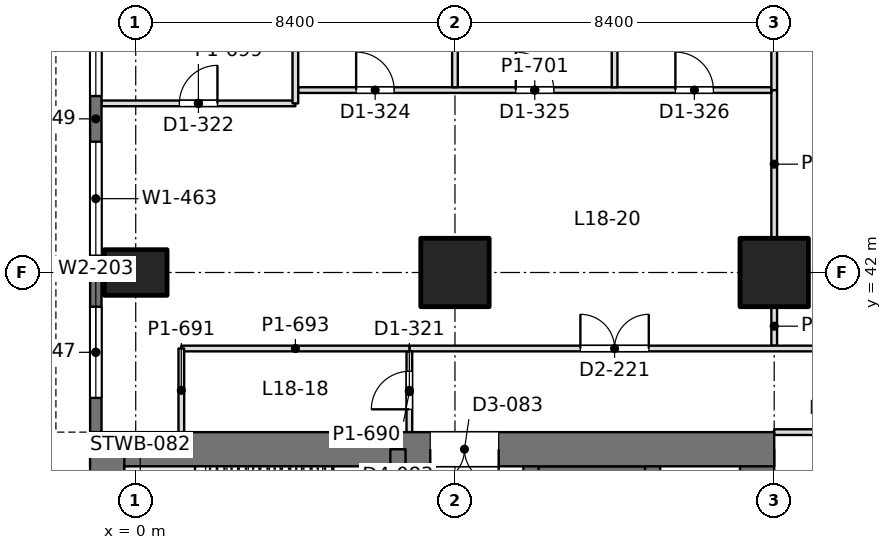
"""IFC4 building model, lengths in metres.
Left out: names, types, materials, properties, quantities, classifications, styles, units other than length and angle.
Written with IfcOpenShell. Run it as: python <this file> out.ifc"""

import sys

from ifc_helpers import new_model, si_unit, direction, frame, frame_2d, origin, origin_2d, place, context, subcontext, project, spatial, rectangle, extrude, element, fill, save


model = new_model("IFC4")
c1 = context("Model", 3, precision=1e-05, world=origin(), true_north=direction((0.0, 1.0)))
c2 = subcontext(c1, "Body", "Model", "MODEL_VIEW")
j1 = project(units=[si_unit("LENGTHUNIT", "METRE"), si_unit("PLANEANGLEUNIT", "RADIAN")], contexts=[c1])
p1 = place(None, origin())
s1 = spatial("IfcSite", under=j1, at=p1, CompositionType="ELEMENT")
p2 = place(p1, origin())
s2 = spatial("IfcBuilding", under=s1, at=p2, CompositionType="ELEMENT")
p3 = place(p2, frame((0.0, 0.0, 81.9)))
s3 = spatial("IfcBuildingStorey", under=s2, at=p3, CompositionType="ELEMENT", Elevation=81.9)
p4 = place(p3, frame((0.0, 42.0, 0.0), z_axis=(0.0, 0.0, 1.0), x_axis=(0.0, 1.0, 0.0)))
e1 = element("IfcColumn", 1, at=p4, inside=s3, PredefinedType="COLUMN", context=c2, shape_type="SweptSolid", body=[
    extrude(rectangle(XDim=1.2, YDim=1.65, at=origin_2d()), origin(), (0.0, 0.0, 1.0), 4.5),
])
for number, where, z_axis, x_axis in (
    (2, (8.4, 42.0, 0.0), (0.0, 0.0, 1.0), (1.0, 0.0, 0.0)),
    (3, (16.8, 42.0, 0.0), (0.0, 0.0, 1.0), (1.0, 0.0, 0.0)),
):
    element("IfcColumn", number, at=place(p3, frame(where, z_axis=z_axis, x_axis=x_axis)), inside=s3, PredefinedType="COLUMN", context=c2, shape_type="SweptSolid", body=[
        extrude(rectangle(XDim=1.8, YDim=1.8, at=origin_2d()), origin(), (0.0, 0.0, 1.0), 4.5),
    ])
p5 = place(p3, frame((-1.2, 37.35, 0.0), z_axis=(0.0, 0.0, 1.0), x_axis=(1.0, 0.0, 0.0)))
e4 = element("IfcWall", 4, at=p5, inside=s3, PredefinedType="SHEAR", context=c2, shape_type="SweptSolid", body=[
    extrude(rectangle(XDim=18.0, YDim=0.9, at=frame_2d((9.0, 0.0))), origin(), (0.0, 0.0, 1.0), 4.5),
])
p6 = place(p5, frame((8.95, 0.0, 0.0)))
e5 = element("IfcOpeningElement", 5, at=p6, cuts=e4, PredefinedType="OPENING", context=c2, shape_type="SweptSolid", body=[
    extrude(rectangle(XDim=1.8, YDim=2.4, at=frame_2d((0.9, 1.2))), frame((0.0, 0.46, 0.0), z_axis=(0.0, -1.0, 0.0), x_axis=(1.0, 0.0, 0.0)), (0.0, 0.0, 1.0), 0.92),
])
for number, where, z_axis, x_axis in (
    (6, (-0.75, 13.05, 0.0), (0.0, 0.0, 1.0), (0.0, 1.0, 0.0)),
    (7, (16.35, 13.05, 0.0), (0.0, 0.0, 1.0), (0.0, 1.0, 0.0)),
):
    element("IfcWall", number, at=place(p3, frame(where, z_axis=z_axis, x_axis=x_axis)), inside=s3, PredefinedType="SHEAR", context=c2, shape_type="SweptSolid", body=[
        extrude(rectangle(XDim=24.3, YDim=0.9, at=frame_2d((12.15, 0.0))), origin(), (0.0, 0.0, 1.0), 4.5),
    ])
p7 = place(p3, frame((6.9, 13.05, 0.0), z_axis=(0.0, 0.0, 1.0), x_axis=(0.0, 1.0, 0.0)))
e8 = element("IfcWall", 8, at=p7, inside=s3, PredefinedType="SHEAR", context=c2, shape_type="SweptSolid", body=[
    extrude(rectangle(XDim=24.3, YDim=0.4, at=frame_2d((12.15, 0.0))), origin(), (0.0, 0.0, 1.0), 4.5),
])
p8 = place(p7, frame((1.3, 0.0, 0.0)))
e9 = element("IfcOpeningElement", 9, at=p8, cuts=e8, PredefinedType="OPENING", context=c2, shape_type="SweptSolid", body=[
    extrude(rectangle(XDim=1.0, YDim=2.2, at=frame_2d((0.5, 1.1))), frame((0.0, 0.21, 0.0), z_axis=(0.0, -1.0, 0.0), x_axis=(1.0, 0.0, 0.0)), (0.0, 0.0, 1.0), 0.42),
])
p9 = place(p7, frame((22.0, 0.0, 0.0)))
e10 = element("IfcOpeningElement", 10, at=p9, cuts=e8, PredefinedType="OPENING", context=c2, shape_type="SweptSolid", body=[
    extrude(rectangle(XDim=1.0, YDim=2.2, at=frame_2d((0.5, 1.1))), frame((0.0, 0.21, 0.0), z_axis=(0.0, -1.0, 0.0), x_axis=(1.0, 0.0, 0.0)), (0.0, 0.0, 1.0), 0.42),
])
p10 = place(p7, frame((5.55, 0.0, 0.0)))
e11 = element("IfcOpeningElement", 11, at=p10, cuts=e8, PredefinedType="OPENING", context=c2, shape_type="SweptSolid", body=[
    extrude(rectangle(XDim=1.0, YDim=2.2, at=frame_2d((0.5, 1.1))), frame((0.0, 0.21, 0.0), z_axis=(0.0, -1.0, 0.0), x_axis=(1.0, 0.0, 0.0)), (0.0, 0.0, 1.0), 0.42),
])
p11 = place(p7, frame((9.55, 0.0, 0.0)))
e12 = element("IfcOpeningElement", 12, at=p11, cuts=e8, PredefinedType="OPENING", context=c2, shape_type="SweptSolid", body=[
    extrude(rectangle(XDim=1.0, YDim=2.2, at=frame_2d((0.5, 1.1))), frame((0.0, 0.21, 0.0), z_axis=(0.0, -1.0, 0.0), x_axis=(1.0, 0.0, 0.0)), (0.0, 0.0, 1.0), 0.42),
])
p12 = place(p7, frame((12.8, 0.0, 0.0)))
e13 = element("IfcOpeningElement", 13, at=p12, cuts=e8, PredefinedType="OPENING", context=c2, shape_type="SweptSolid", body=[
    extrude(rectangle(XDim=1.1, YDim=2.2, at=frame_2d((0.55, 1.1))), frame((0.0, 0.21, 0.0), z_axis=(0.0, -1.0, 0.0), x_axis=(1.0, 0.0, 0.0)), (0.0, 0.0, 1.0), 0.42),
])
p13 = place(p7, frame((15.538, 0.0, 0.0)))
e14 = element("IfcOpeningElement", 14, at=p13, cuts=e8, PredefinedType="OPENING", context=c2, shape_type="SweptSolid", body=[
    extrude(rectangle(XDim=1.1, YDim=2.2, at=frame_2d((0.55, 1.1))), frame((0.0, 0.21, 0.0), z_axis=(0.0, -1.0, 0.0), x_axis=(1.0, 0.0, 0.0)), (0.0, 0.0, 1.0), 0.42),
])
p14 = place(p7, frame((18.262, 0.0, 0.0)))
e15 = element("IfcOpeningElement", 15, at=p14, cuts=e8, PredefinedType="OPENING", context=c2, shape_type="SweptSolid", body=[
    extrude(rectangle(XDim=1.1, YDim=2.2, at=frame_2d((0.55, 1.1))), frame((0.0, 0.21, 0.0), z_axis=(0.0, -1.0, 0.0), x_axis=(1.0, 0.0, 0.0)), (0.0, 0.0, 1.0), 0.42),
])
p15 = place(p3, frame((10.4, 13.05, 0.0), z_axis=(0.0, 0.0, 1.0), x_axis=(0.0, 1.0, 0.0)))
e16 = element("IfcWall", 16, at=p15, inside=s3, PredefinedType="SHEAR", context=c2, shape_type="SweptSolid", body=[
    extrude(rectangle(XDim=24.3, YDim=0.4, at=frame_2d((12.15, 0.0))), origin(), (0.0, 0.0, 1.0), 4.5),
])
p16 = place(p15, frame((1.5, 0.0, 0.0)))
e17 = element("IfcOpeningElement", 17, at=p16, cuts=e16, PredefinedType="OPENING", context=c2, shape_type="SweptSolid", body=[
    extrude(rectangle(XDim=1.1, YDim=2.2, at=frame_2d((0.55, 1.1))), frame((0.0, 0.21, 0.0), z_axis=(0.0, -1.0, 0.0), x_axis=(1.0, 0.0, 0.0)), (0.0, 0.0, 1.0), 0.42),
])
p17 = place(p15, frame((4.35, 0.0, 0.0)))
e18 = element("IfcOpeningElement", 18, at=p17, cuts=e16, PredefinedType="OPENING", context=c2, shape_type="SweptSolid", body=[
    extrude(rectangle(XDim=1.1, YDim=2.2, at=frame_2d((0.55, 1.1))), frame((0.0, 0.21, 0.0), z_axis=(0.0, -1.0, 0.0), x_axis=(1.0, 0.0, 0.0)), (0.0, 0.0, 1.0), 0.42),
])
p18 = place(p15, frame((7.2, 0.0, 0.0)))
e19 = element("IfcOpeningElement", 19, at=p18, cuts=e16, PredefinedType="OPENING", context=c2, shape_type="SweptSolid", body=[
    extrude(rectangle(XDim=1.1, YDim=2.2, at=frame_2d((0.55, 1.1))), frame((0.0, 0.21, 0.0), z_axis=(0.0, -1.0, 0.0), x_axis=(1.0, 0.0, 0.0)), (0.0, 0.0, 1.0), 0.42),
])
p19 = place(p15, frame((21.45, 0.0, 0.0)))
e20 = element("IfcOpeningElement", 20, at=p19, cuts=e16, PredefinedType="OPENING", context=c2, shape_type="SweptSolid", body=[
    extrude(rectangle(XDim=1.1, YDim=2.2, at=frame_2d((0.55, 1.1))), frame((0.0, 0.21, 0.0), z_axis=(0.0, -1.0, 0.0), x_axis=(1.0, 0.0, 0.0)), (0.0, 0.0, 1.0), 0.42),
])
p20 = place(p3, frame((13.6, 13.05, 0.0), z_axis=(0.0, 0.0, 1.0), x_axis=(0.0, 1.0, 0.0)))
e21 = element("IfcWall", 21, at=p20, inside=s3, PredefinedType="SHEAR", context=c2, shape_type="SweptSolid", body=[
    extrude(rectangle(XDim=24.3, YDim=0.4, at=frame_2d((12.15, 0.0))), origin(), (0.0, 0.0, 1.0), 4.5),
])
p21 = place(p3, frame((10.4, 36.625, 0.0), z_axis=(0.0, 0.0, 1.0), x_axis=(1.0, 0.0, 0.0)))
e22 = element("IfcWall", 22, at=p21, inside=s3, PredefinedType="SHEAR", context=c2, shape_type="SweptSolid", body=[
    extrude(rectangle(XDim=3.2, YDim=0.55, at=frame_2d((1.6, 0.0))), origin(), (0.0, 0.0, 1.0), 4.5),
])
p22 = place(p3, frame((-1.05, 37.8, 0.0), z_axis=(0.0, 0.0, 1.0), x_axis=(0.0, 1.0, 0.0)))
e23 = element("IfcWall", 23, at=p22, inside=s3, PredefinedType="SOLIDWALL", context=c2, shape_type="SweptSolid", body=[
    extrude(rectangle(XDim=4.2, YDim=0.3, at=frame_2d((2.1, 0.0))), origin(), (0.0, 0.0, 1.0), 4.34),
])
p23 = place(p22, frame((0.9, 0.0, 0.9)))
e24 = element("IfcOpeningElement", 24, at=p23, cuts=e23, PredefinedType="OPENING", context=c2, shape_type="SweptSolid", body=[
    extrude(rectangle(XDim=2.4, YDim=1.9, at=frame_2d((1.2, 0.95))), frame((0.0, 0.16, 0.0), z_axis=(0.0, -1.0, 0.0), x_axis=(1.0, 0.0, 0.0)), (0.0, 0.0, 1.0), 0.32),
])
p24 = place(p3, frame((-1.05, 42.0, 0.0), z_axis=(0.0, 0.0, 1.0), x_axis=(0.0, 1.0, 0.0)))
e25 = element("IfcWall", 25, at=p24, inside=s3, PredefinedType="SOLIDWALL", context=c2, shape_type="SweptSolid", body=[
    extrude(rectangle(XDim=8.085, YDim=0.3, at=frame_2d((4.042, 0.0))), origin(), (0.0, 0.0, 1.0), 4.34),
])
p25 = place(p24, frame((0.443, 0.0, 0.9)))
e26 = element("IfcOpeningElement", 26, at=p25, cuts=e25, PredefinedType="OPENING", context=c2, shape_type="SweptSolid", body=[
    extrude(rectangle(XDim=3.0, YDim=1.9, at=frame_2d((1.5, 0.95))), frame((0.0, 0.16, 0.0), z_axis=(0.0, -1.0, 0.0), x_axis=(1.0, 0.0, 0.0)), (0.0, 0.0, 1.0), 0.32),
])
p26 = place(p24, frame((4.643, 0.0, 0.9)))
e27 = element("IfcOpeningElement", 27, at=p26, cuts=e25, PredefinedType="OPENING", context=c2, shape_type="SweptSolid", body=[
    extrude(rectangle(XDim=3.0, YDim=1.9, at=frame_2d((1.5, 0.95))), frame((0.0, 0.16, 0.0), z_axis=(0.0, -1.0, 0.0), x_axis=(1.0, 0.0, 0.0)), (0.0, 0.0, 1.0), 0.32),
])
p27 = place(p3, frame((-0.902, 46.45, 0.0), z_axis=(0.0, 0.0, 1.0), x_axis=(1.0, 0.0, 0.0)))
e28 = element("IfcWall", 28, at=p27, inside=s3, PredefinedType="PARTITIONING", context=c2, shape_type="SweptSolid", body=[
    extrude(rectangle(XDim=5.102, YDim=0.15, at=frame_2d((2.551, 0.0))), origin(), (0.0, 0.0, 1.0), 3.84),
])
p28 = place(p27, frame((2.052, 0.0, 0.0)))
e29 = element("IfcOpeningElement", 29, at=p28, cuts=e28, PredefinedType="OPENING", context=c2, shape_type="SweptSolid", body=[
    extrude(rectangle(XDim=1.0, YDim=2.2, at=frame_2d((0.5, 1.1))), frame((0.0, 0.085, 0.0), z_axis=(0.0, -1.0, 0.0), x_axis=(1.0, 0.0, 0.0)), (0.0, 0.0, 1.0), 0.17),
])
p29 = place(p3, frame((4.274, 46.8, 0.0), z_axis=(0.0, 0.0, 1.0), x_axis=(1.0, 0.0, 0.0)))
e30 = element("IfcWall", 30, at=p29, inside=s3, PredefinedType="PARTITIONING", context=c2, shape_type="SweptSolid", body=[
    extrude(rectangle(XDim=12.452, YDim=0.15, at=frame_2d((6.226, 0.0))), origin(), (0.0, 0.0, 1.0), 3.74),
])
p30 = place(p29, frame((1.526, 0.0, 0.0)))
e31 = element("IfcOpeningElement", 31, at=p30, cuts=e30, PredefinedType="OPENING", context=c2, shape_type="SweptSolid", body=[
    extrude(rectangle(XDim=1.0, YDim=2.2, at=frame_2d((0.5, 1.1))), frame((0.0, 0.085, 0.0), z_axis=(0.0, -1.0, 0.0), x_axis=(1.0, 0.0, 0.0)), (0.0, 0.0, 1.0), 0.17),
])
p31 = place(p29, frame((5.726, 0.0, 0.0)))
e32 = element("IfcOpeningElement", 32, at=p31, cuts=e30, PredefinedType="OPENING", context=c2, shape_type="SweptSolid", body=[
    extrude(rectangle(XDim=1.0, YDim=2.2, at=frame_2d((0.5, 1.1))), frame((0.0, 0.085, 0.0), z_axis=(0.0, -1.0, 0.0), x_axis=(1.0, 0.0, 0.0)), (0.0, 0.0, 1.0), 0.17),
])
p32 = place(p29, frame((9.926, 0.0, 0.0)))
e33 = element("IfcOpeningElement", 33, at=p32, cuts=e30, PredefinedType="OPENING", context=c2, shape_type="SweptSolid", body=[
    extrude(rectangle(XDim=1.0, YDim=2.2, at=frame_2d((0.5, 1.1))), frame((0.0, 0.085, 0.0), z_axis=(0.0, -1.0, 0.0), x_axis=(1.0, 0.0, 0.0)), (0.0, 0.0, 1.0), 0.17),
])
p33 = place(p3, frame((4.2, 46.45, 0.0), z_axis=(0.0, 0.0, 1.0), x_axis=(0.0, 1.0, 0.0)))
e34 = element("IfcWall", 34, at=p33, inside=s3, PredefinedType="PARTITIONING", context=c2, shape_type="SweptSolid", body=[
    extrude(rectangle(XDim=4.852, YDim=0.15, at=frame_2d((2.426, 0.0))), origin(), (0.0, 0.0, 1.0), 3.84),
])
p34 = place(p3, frame((8.4, 46.874, 0.0), z_axis=(0.0, 0.0, 1.0), x_axis=(0.0, 1.0, 0.0)))
e35 = element("IfcWall", 35, at=p34, inside=s3, PredefinedType="PARTITIONING", context=c2, shape_type="SweptSolid", body=[
    extrude(rectangle(XDim=2.727, YDim=0.15, at=frame_2d((1.364, 0.0))), origin(), (0.0, 0.0, 1.0), 3.74),
])
p35 = place(p3, frame((12.6, 46.874, 0.0), z_axis=(0.0, 0.0, 1.0), x_axis=(0.0, 1.0, 0.0)))
e36 = element("IfcWall", 36, at=p35, inside=s3, PredefinedType="PARTITIONING", context=c2, shape_type="SweptSolid", body=[
    extrude(rectangle(XDim=4.428, YDim=0.15, at=frame_2d((2.214, 0.0))), origin(), (0.0, 0.0, 1.0), 3.84),
])
p36 = place(p3, frame((16.8, 46.798, 0.0), z_axis=(0.0, 0.0, 1.0), x_axis=(0.0, 1.0, 0.0)))
e37 = element("IfcWall", 37, at=p36, inside=s3, PredefinedType="PARTITIONING", context=c2, shape_type="SweptSolid", body=[
    extrude(rectangle(XDim=2.803, YDim=0.15, at=frame_2d((1.401, 0.0))), origin(), (0.0, 0.0, 1.0), 3.74),
])
p37 = place(p3, frame((16.8, 40.074, 0.0), z_axis=(0.0, 0.0, 1.0), x_axis=(0.0, 1.0, 0.0)))
e38 = element("IfcWall", 38, at=p37, inside=s3, PredefinedType="PARTITIONING", context=c2, shape_type="SweptSolid", body=[
    extrude(rectangle(XDim=1.027, YDim=0.15, at=frame_2d((0.514, 0.0))), origin(), (0.0, 0.0, 1.0), 3.98),
])
p38 = place(p3, frame((16.8, 42.899, 0.0), z_axis=(0.0, 0.0, 1.0), x_axis=(0.0, 1.0, 0.0)))
e39 = element("IfcWall", 39, at=p38, inside=s3, PredefinedType="PARTITIONING", context=c2, shape_type="SweptSolid", body=[
    extrude(rectangle(XDim=3.903, YDim=0.15, at=frame_2d((1.952, 0.0))), origin(), (0.0, 0.0, 1.0), 3.74),
])
p39 = place(p3, frame((7.198, 40.0, 0.0), z_axis=(0.0, 0.0, 1.0), x_axis=(1.0, 0.0, 0.0)))
e40 = element("IfcWall", 40, at=p39, inside=s3, PredefinedType="PARTITIONING", context=c2, shape_type="SweptSolid", body=[
    extrude(rectangle(XDim=42.002, YDim=0.15, at=frame_2d((21.001, 0.0))), origin(), (0.0, 0.0, 1.0), 3.74),
])
p40 = place(p39, frame((4.502, 0.0, 0.0)))
e41 = element("IfcOpeningElement", 41, at=p40, cuts=e40, PredefinedType="OPENING", context=c2, shape_type="SweptSolid", body=[
    extrude(rectangle(XDim=1.8, YDim=2.2, at=frame_2d((0.9, 1.1))), frame((0.0, 0.085, 0.0), z_axis=(0.0, -1.0, 0.0), x_axis=(1.0, 0.0, 0.0)), (0.0, 0.0, 1.0), 0.17),
])
p41 = place(p39, frame((12.902, 0.0, 0.0)))
e42 = element("IfcOpeningElement", 42, at=p41, cuts=e40, PredefinedType="OPENING", context=c2, shape_type="SweptSolid", body=[
    extrude(rectangle(XDim=1.8, YDim=2.2, at=frame_2d((0.9, 1.1))), frame((0.0, 0.085, 0.0), z_axis=(0.0, -1.0, 0.0), x_axis=(1.0, 0.0, 0.0)), (0.0, 0.0, 1.0), 0.17),
])
p42 = place(p39, frame((21.302, 0.0, 0.0)))
e43 = element("IfcOpeningElement", 43, at=p42, cuts=e40, PredefinedType="OPENING", context=c2, shape_type="SweptSolid", body=[
    extrude(rectangle(XDim=1.8, YDim=2.2, at=frame_2d((0.9, 1.1))), frame((0.0, 0.085, 0.0), z_axis=(0.0, -1.0, 0.0), x_axis=(1.0, 0.0, 0.0)), (0.0, 0.0, 1.0), 0.17),
])
p43 = place(p39, frame((29.702, 0.0, 0.0)))
e44 = element("IfcOpeningElement", 44, at=p43, cuts=e40, PredefinedType="OPENING", context=c2, shape_type="SweptSolid", body=[
    extrude(rectangle(XDim=1.8, YDim=2.2, at=frame_2d((0.9, 1.1))), frame((0.0, 0.085, 0.0), z_axis=(0.0, -1.0, 0.0), x_axis=(1.0, 0.0, 0.0)), (0.0, 0.0, 1.0), 0.17),
])
p44 = place(p39, frame((38.102, 0.0, 0.0)))
e45 = element("IfcOpeningElement", 45, at=p44, cuts=e40, PredefinedType="OPENING", context=c2, shape_type="SweptSolid", body=[
    extrude(rectangle(XDim=1.8, YDim=2.2, at=frame_2d((0.9, 1.1))), frame((0.0, 0.085, 0.0), z_axis=(0.0, -1.0, 0.0), x_axis=(1.0, 0.0, 0.0)), (0.0, 0.0, 1.0), 0.17),
])
p45 = place(p3, frame((7.2, 37.8, 0.0), z_axis=(0.0, 0.0, 1.0), x_axis=(0.0, 1.0, 0.0)))
e46 = element("IfcWall", 46, at=p45, inside=s3, PredefinedType="PARTITIONING", context=c2, shape_type="SweptSolid", body=[
    extrude(rectangle(XDim=2.126, YDim=0.15, at=frame_2d((1.063, 0.0))), origin(), (0.0, 0.0, 1.0), 4.34),
])
p46 = place(p45, frame((0.6, 0.0, 0.0)))
e47 = element("IfcOpeningElement", 47, at=p46, cuts=e46, PredefinedType="OPENING", context=c2, shape_type="SweptSolid", body=[
    extrude(rectangle(XDim=1.0, YDim=2.2, at=frame_2d((0.5, 1.1))), frame((0.0, 0.085, 0.0), z_axis=(0.0, -1.0, 0.0), x_axis=(1.0, 0.0, 0.0)), (0.0, 0.0, 1.0), 0.17),
])
p47 = place(p3, frame((1.2, 40.0, 0.0), z_axis=(0.0, 0.0, 1.0), x_axis=(1.0, 0.0, 0.0)))
e48 = element("IfcWall", 48, at=p47, inside=s3, PredefinedType="PARTITIONING", context=c2, shape_type="SweptSolid", body=[
    extrude(rectangle(XDim=6.002, YDim=0.15, at=frame_2d((3.001, 0.0))), origin(), (0.0, 0.0, 1.0), 3.98),
])
p48 = place(p3, frame((1.2, 37.8, 0.0), z_axis=(0.0, 0.0, 1.0), x_axis=(0.0, 1.0, 0.0)))
e49 = element("IfcWall", 49, at=p48, inside=s3, PredefinedType="PARTITIONING", context=c2, shape_type="SweptSolid", body=[
    extrude(rectangle(XDim=2.2, YDim=0.15, at=frame_2d((1.1, 0.0))), origin(), (0.0, 0.0, 1.0), 4.34),
])
p49 = place(p3, frame((16.798, 37.8, 0.0), z_axis=(0.0, 0.0, 1.0), x_axis=(1.0, 0.0, 0.0)))
e50 = element("IfcWall", 50, at=p49, inside=s3, PredefinedType="PARTITIONING", context=c2, shape_type="SweptSolid", body=[
    extrude(rectangle(XDim=16.804, YDim=0.15, at=frame_2d((8.402, 0.0))), origin(), (0.0, 0.0, 1.0), 3.74),
])
p50 = place(p49, frame((1.352, 0.0, 0.0)))
e51 = element("IfcOpeningElement", 51, at=p50, cuts=e50, PredefinedType="OPENING", context=c2, shape_type="SweptSolid", body=[
    extrude(rectangle(XDim=1.0, YDim=2.2, at=frame_2d((0.5, 1.1))), frame((0.0, 0.085, 0.0), z_axis=(0.0, -1.0, 0.0), x_axis=(1.0, 0.0, 0.0)), (0.0, 0.0, 1.0), 0.17),
])
p51 = place(p49, frame((7.852, 0.0, 0.0)))
e52 = element("IfcOpeningElement", 52, at=p51, cuts=e50, PredefinedType="OPENING", context=c2, shape_type="SweptSolid", body=[
    extrude(rectangle(XDim=1.0, YDim=2.2, at=frame_2d((0.5, 1.1))), frame((0.0, 0.085, 0.0), z_axis=(0.0, -1.0, 0.0), x_axis=(1.0, 0.0, 0.0)), (0.0, 0.0, 1.0), 0.17),
])
p52 = place(p49, frame((14.402, 0.0, 0.0)))
e53 = element("IfcOpeningElement", 53, at=p52, cuts=e50, PredefinedType="OPENING", context=c2, shape_type="SweptSolid", body=[
    extrude(rectangle(XDim=1.0, YDim=2.2, at=frame_2d((0.5, 1.1))), frame((0.0, 0.085, 0.0), z_axis=(0.0, -1.0, 0.0), x_axis=(1.0, 0.0, 0.0)), (0.0, 0.0, 1.0), 0.17),
])
p53 = place(p23, origin())
e54 = element("IfcWindow", 54, at=p53, inside=s3, PartitioningType="SINGLE_PANEL", PredefinedType="WINDOW", context=c2, shape_type="SweptSolid", body=[
    extrude(rectangle(XDim=2.4, YDim=1.9, at=frame_2d((1.2, 0.95))), frame((0.0, 0.03, 0.0), z_axis=(0.0, -1.0, 0.0), x_axis=(1.0, 0.0, 0.0)), (0.0, 0.0, 1.0), 0.06),
])
fill(e24, e54)
p54 = place(p25, origin())
e55 = element("IfcWindow", 55, at=p54, inside=s3, PartitioningType="SINGLE_PANEL", PredefinedType="WINDOW", context=c2, shape_type="SweptSolid", body=[
    extrude(rectangle(XDim=3.0, YDim=1.9, at=frame_2d((1.5, 0.95))), frame((0.0, 0.03, 0.0), z_axis=(0.0, -1.0, 0.0), x_axis=(1.0, 0.0, 0.0)), (0.0, 0.0, 1.0), 0.06),
])
fill(e26, e55)
p55 = place(p26, origin())
e56 = element("IfcWindow", 56, at=p55, inside=s3, PartitioningType="SINGLE_PANEL", PredefinedType="WINDOW", context=c2, shape_type="SweptSolid", body=[
    extrude(rectangle(XDim=3.0, YDim=1.9, at=frame_2d((1.5, 0.95))), frame((0.0, 0.03, 0.0), z_axis=(0.0, -1.0, 0.0), x_axis=(1.0, 0.0, 0.0)), (0.0, 0.0, 1.0), 0.06),
])
fill(e27, e56)
p56 = place(p6, frame((1.8, 0.0, 0.0), z_axis=(0.0, 0.0, 1.0), x_axis=(-1.0, 0.0, 0.0)))
e57 = element("IfcDoor", 57, at=p56, inside=s3, OperationType="DOUBLE_DOOR_SINGLE_SWING", PredefinedType="DOOR", context=c2, shape_type="SweptSolid", body=[
    extrude(rectangle(XDim=1.8, YDim=2.4, at=frame_2d((0.9, 1.2))), frame((0.0, 0.025, 0.0), z_axis=(0.0, -1.0, 0.0), x_axis=(1.0, 0.0, 0.0)), (0.0, 0.0, 1.0), 0.05),
])
fill(e5, e57)
p57 = place(p28, origin())
e58 = element("IfcDoor", 58, at=p57, inside=s3, OperationType="SINGLE_SWING_RIGHT", PredefinedType="DOOR", context=c2, shape_type="SweptSolid", body=[
    extrude(rectangle(XDim=1.0, YDim=2.2, at=frame_2d((0.5, 1.1))), frame((0.0, 0.025, 0.0), z_axis=(0.0, -1.0, 0.0), x_axis=(1.0, 0.0, 0.0)), (0.0, 0.0, 1.0), 0.05),
])
fill(e29, e58)
p58 = place(p30, origin())
e59 = element("IfcDoor", 59, at=p58, inside=s3, OperationType="SINGLE_SWING_LEFT", PredefinedType="DOOR", context=c2, shape_type="SweptSolid", body=[
    extrude(rectangle(XDim=1.0, YDim=2.2, at=frame_2d((0.5, 1.1))), frame((0.0, 0.025, 0.0), z_axis=(0.0, -1.0, 0.0), x_axis=(1.0, 0.0, 0.0)), (0.0, 0.0, 1.0), 0.05),
])
fill(e31, e59)
p59 = place(p31, origin())
e60 = element("IfcDoor", 60, at=p59, inside=s3, OperationType="SINGLE_SWING_LEFT", PredefinedType="DOOR", context=c2, shape_type="SweptSolid", body=[
    extrude(rectangle(XDim=1.0, YDim=2.2, at=frame_2d((0.5, 1.1))), frame((0.0, 0.025, 0.0), z_axis=(0.0, -1.0, 0.0), x_axis=(1.0, 0.0, 0.0)), (0.0, 0.0, 1.0), 0.05),
])
fill(e32, e60)
p60 = place(p32, origin())
e61 = element("IfcDoor", 61, at=p60, inside=s3, OperationType="SINGLE_SWING_LEFT", PredefinedType="DOOR", context=c2, shape_type="SweptSolid", body=[
    extrude(rectangle(XDim=1.0, YDim=2.2, at=frame_2d((0.5, 1.1))), frame((0.0, 0.025, 0.0), z_axis=(0.0, -1.0, 0.0), x_axis=(1.0, 0.0, 0.0)), (0.0, 0.0, 1.0), 0.05),
])
fill(e33, e61)
p61 = place(p40, origin())
e62 = element("IfcDoor", 62, at=p61, inside=s3, OperationType="DOUBLE_DOOR_SINGLE_SWING", PredefinedType="DOOR", context=c2, shape_type="SweptSolid", body=[
    extrude(rectangle(XDim=1.8, YDim=2.2, at=frame_2d((0.9, 1.1))), frame((0.0, 0.025, 0.0), z_axis=(0.0, -1.0, 0.0), x_axis=(1.0, 0.0, 0.0)), (0.0, 0.0, 1.0), 0.05),
])
fill(e41, e62)
p62 = place(p46, origin())
e63 = element("IfcDoor", 63, at=p62, inside=s3, OperationType="SINGLE_SWING_LEFT", PredefinedType="DOOR", context=c2, shape_type="SweptSolid", body=[
    extrude(rectangle(XDim=1.0, YDim=2.2, at=frame_2d((0.5, 1.1))), frame((0.0, 0.025, 0.0), z_axis=(0.0, -1.0, 0.0), x_axis=(1.0, 0.0, 0.0)), (0.0, 0.0, 1.0), 0.05),
])
fill(e47, e63)
save(model, sys.argv[1])
